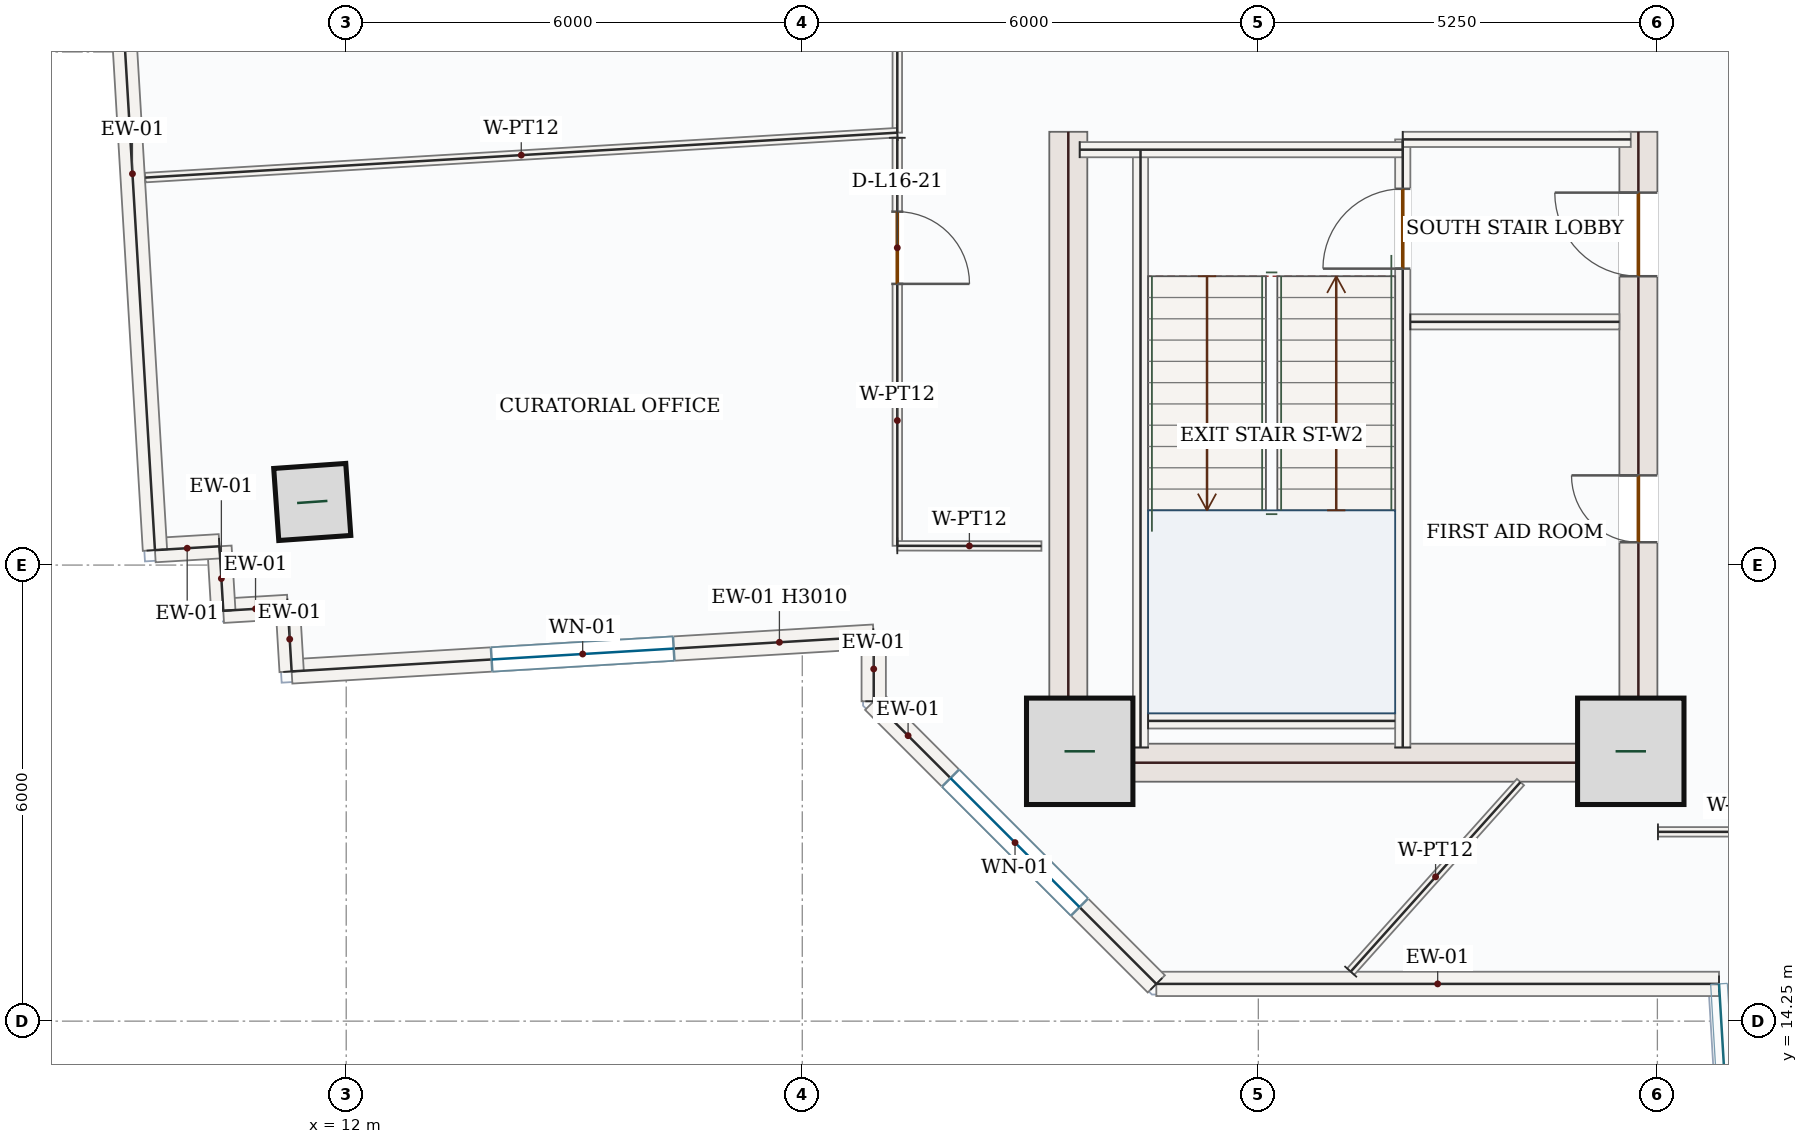
"""IFC4 building model, lengths in metres.
Left out: names, types, materials, properties, quantities, classifications, styles, units other than length and angle.
Written with IfcOpenShell. Run it as: python <this file> out.ifc"""

import sys

from ifc_helpers import new_model, si_unit, direction, frame, frame_2d, origin, origin_2d, place, context, subcontext, project, spatial, rectangle, hollow_rectangle, extrude, source, transform, mapped, element, fill, save


model = new_model("IFC4")
c1 = context("Model", 3, precision=1e-05, world=origin(), true_north=direction((0.0, 1.0)))
c2 = subcontext(c1, "Body", "Model", "MODEL_VIEW")
j1 = project(units=[si_unit("LENGTHUNIT", "METRE"), si_unit("PLANEANGLEUNIT", "RADIAN")], contexts=[c1])
p1 = place(None, origin())
s1 = spatial("IfcSite", under=j1, at=p1, CompositionType="ELEMENT")
p2 = place(p1, origin())
s2 = spatial("IfcBuilding", under=s1, at=p2, CompositionType="ELEMENT")
p3 = place(p2, frame((0.0, 0.0, 75.3)))
s3 = spatial("IfcBuildingStorey", under=s2, at=p3, CompositionType="ELEMENT", Elevation=75.3)
m1 = source(origin(), c2, "Body", "SweptSolid", [
    extrude(rectangle(XDim=8.55, YDim=0.5, at=frame_2d((4.275, 0.0))), origin(), (0.0, 0.0, 1.0), 3.95),
])
p4 = place(p3, frame((21.5, 17.4, 0.0), z_axis=(0.0, 0.0, 1.0), x_axis=(0.0, 1.0, 0.0)))
e1 = element("IfcWall", 1, at=p4, inside=s3, PredefinedType="SHEAR", context=c2, shape_type="MappedRepresentation", body=[
    mapped(m1, transform((0.0, 0.0, 0.0), x_axis=(1.0, 0.0, 0.0), y_axis=(0.0, 1.0, 0.0), z_axis=(0.0, 0.0, 1.0), scale=1.0)),
])
p5 = place(p3, frame((29.0, 17.4, 0.0), z_axis=(0.0, 0.0, 1.0), x_axis=(0.0, 1.0, 0.0)))
e2 = element("IfcWall", 2, at=p5, inside=s3, PredefinedType="SHEAR", context=c2, shape_type="SweptSolid", body=[
    extrude(rectangle(XDim=8.55, YDim=0.5, at=frame_2d((4.275, 0.0))), origin(), (0.0, 0.0, 1.0), 3.95),
])
p6 = place(p5, frame((6.65, 0.0, 0.0)))
e3 = element("IfcOpeningElement", 3, at=p6, cuts=e2, PredefinedType="OPENING", context=c2, shape_type="SweptSolid", body=[
    extrude(rectangle(XDim=1.1, YDim=2.2, at=frame_2d((0.55, 1.1))), frame((0.0, 0.26, 0.0), z_axis=(0.0, -1.0, 0.0), x_axis=(1.0, 0.0, 0.0)), (0.0, 0.0, 1.0), 0.52),
])
p7 = place(p5, frame((3.15, 0.0, 0.0)))
e4 = element("IfcOpeningElement", 4, at=p7, cuts=e2, PredefinedType="OPENING", context=c2, shape_type="SweptSolid", body=[
    extrude(rectangle(XDim=0.88, YDim=2.1, at=frame_2d((0.44, 1.05))), frame((0.0, 0.26, 0.0), z_axis=(0.0, -1.0, 0.0), x_axis=(1.0, 0.0, 0.0)), (0.0, 0.0, 1.0), 0.52),
])
m2 = source(origin(), c2, "Body", "SweptSolid", [
    extrude(rectangle(XDim=7.0, YDim=0.5, at=frame_2d((3.5, 0.0))), origin(), (0.0, 0.0, 1.0), 3.95),
])
p8 = place(p3, frame((21.75, 17.65, 0.0), z_axis=(0.0, 0.0, 1.0), x_axis=(1.0, 0.0, 0.0)))
e5 = element("IfcWall", 5, at=p8, inside=s3, PredefinedType="SHEAR", context=c2, shape_type="MappedRepresentation", body=[
    mapped(m2, transform((0.0, 0.0, 0.0), x_axis=(1.0, 0.0, 0.0), y_axis=(0.0, 1.0, 0.0), z_axis=(0.0, 0.0, 1.0), scale=1.0)),
])
m3 = source(origin(), c2, "Body", "SweptSolid", [
    extrude(rectangle(XDim=1.4, YDim=1.4, at=origin_2d()), origin(), (0.0, 0.0, 1.0), 4.2),
])
for number, where, z_axis, x_axis in (
    (6, (21.65, 17.8, 0.0), (0.0, 0.0, 1.0), (1.0, 0.0, 0.0)),
    (7, (28.9, 17.8, 0.0), (0.0, 0.0, 1.0), (1.0, 0.0, 0.0)),
):
    element("IfcColumn", number, at=place(p3, frame(where, z_axis=z_axis, x_axis=x_axis)), inside=s3, PredefinedType="COLUMN", context=c2, shape_type="MappedRepresentation", body=[
        mapped(m3, transform((0.0, 0.0, 0.0), x_axis=(1.0, 0.0, 0.0), y_axis=(0.0, 1.0, 0.0), z_axis=(0.0, 0.0, 1.0), scale=1.0)),
    ])
m4 = source(origin(), c2, "Body", "SweptSolid", [
    extrude(hollow_rectangle(XDim=0.95, YDim=0.95, WallThickness=0.05, at=origin_2d()), origin(), (0.0, 0.0, 1.0), 4.2),
])
p9 = place(p3, frame((11.553, 21.08, 0.0), z_axis=(0.0, 0.0, 1.0), x_axis=(0.99756405026, 0.069756473744, 0.0)))
e8 = element("IfcColumn", 8, at=p9, inside=s3, PredefinedType="COLUMN", context=c2, shape_type="MappedRepresentation", body=[
    mapped(m4, transform((0.0, 0.0, 0.0), x_axis=(1.0, 0.0, 0.0), y_axis=(0.0, 1.0, 0.0), z_axis=(0.0, 0.0, 1.0), scale=1.0)),
])
m5 = source(origin(), c2, "Body", "SweptSolid", [
    extrude(rectangle(XDim=7.403, YDim=0.32, at=frame_2d((3.701, 0.0))), origin(), (0.0, 0.0, 1.0), 3.95),
])
p10 = place(p3, frame((30.061, 14.74, 0.0), z_axis=(0.0, 0.0, 1.0), x_axis=(-1.0, 0.0, 0.0)))
e9 = element("IfcWall", 9, at=p10, inside=s3, PredefinedType="SOLIDWALL", context=c2, shape_type="MappedRepresentation", body=[
    mapped(m5, transform((0.0, 0.0, 0.0), x_axis=(1.0, 0.0, 0.0), y_axis=(0.0, 1.0, 0.0), z_axis=(0.0, 0.0, 1.0), scale=1.0)),
])
p11 = place(p3, frame((22.658, 14.74, 0.0), z_axis=(0.0, 0.0, 1.0), x_axis=(-0.707106781187, 0.707106781187, 0.0)))
e10 = element("IfcWall", 10, at=p11, inside=s3, PredefinedType="SOLIDWALL", context=c2, shape_type="SweptSolid", body=[
    extrude(rectangle(XDim=5.258, YDim=0.32, at=frame_2d((2.629, 0.0))), origin(), (0.0, 0.0, 1.0), 3.95),
])
p12 = place(p11, frame((1.429, 0.0, 0.85)))
e11 = element("IfcOpeningElement", 11, at=p12, cuts=e10, PredefinedType="OPENING", context=c2, shape_type="SweptSolid", body=[
    extrude(rectangle(XDim=2.4, YDim=1.8, at=frame_2d((1.2, 0.9))), frame((0.0, 0.17, 0.0), z_axis=(0.0, -1.0, 0.0), x_axis=(1.0, 0.0, 0.0)), (0.0, 0.0, 1.0), 0.34),
])
m6 = source(origin(), c2, "Body", "SweptSolid", [
    extrude(rectangle(XDim=0.851, YDim=0.32, at=frame_2d((0.425, 0.0))), origin(), (0.0, 0.0, 1.0), 3.95),
])
p13 = place(p3, frame((18.94, 18.458, 0.0), z_axis=(0.0, 0.0, 1.0), x_axis=(0.0, 1.0, 0.0)))
e12 = element("IfcWall", 12, at=p13, inside=s3, PredefinedType="SOLIDWALL", context=c2, shape_type="MappedRepresentation", body=[
    mapped(m6, transform((0.0, 0.0, 0.0), x_axis=(1.0, 0.0, 0.0), y_axis=(0.0, 1.0, 0.0), z_axis=(0.0, 0.0, 1.0), scale=1.0)),
])
p14 = place(p3, frame((18.94, 19.309, 0.0), z_axis=(0.0, 0.0, 1.0), x_axis=(-0.998218176762, -0.059669687296, 0.0)))
e13 = element("IfcWall", 13, at=p14, inside=s3, PredefinedType="SOLIDWALL", context=c2, shape_type="SweptSolid", body=[
    extrude(rectangle(XDim=7.672, YDim=0.32, at=frame_2d((3.836, 0.0))), origin(), (0.0, 0.0, 1.0), 3.01),
])
p15 = place(p14, frame((2.636, 0.0, 0.85)))
e14 = element("IfcOpeningElement", 14, at=p15, cuts=e13, PredefinedType="OPENING", context=c2, shape_type="SweptSolid", body=[
    extrude(rectangle(XDim=2.4, YDim=1.8, at=frame_2d((1.2, 0.9))), frame((0.0, 0.17, 0.0), z_axis=(0.0, -1.0, 0.0), x_axis=(1.0, 0.0, 0.0)), (0.0, 0.0, 1.0), 0.34),
])
m7 = source(origin(), c2, "Body", "SweptSolid", [
    extrude(rectangle(XDim=0.85, YDim=0.32, at=frame_2d((0.425, 0.0))), origin(), (0.0, 0.0, 1.0), 3.95),
])
for number, where, z_axis, x_axis in (
    (15, (11.282, 18.851, 0.0), (0.0, 0.0, 1.0), (-0.059, 0.998, 0.0)),
    (16, (11.231, 19.699, 0.0), (0.0, 0.0, 1.0), (-0.998, -0.06, 0.0)),
    (17, (10.383, 19.649, 0.0), (0.0, 0.0, 1.0), (-0.059, 0.998, 0.0)),
    (18, (10.332, 20.497, 0.0), (0.0, 0.0, 1.0), (-0.998, -0.06, 0.0)),
):
    element("IfcWall", number, at=place(p3, frame(where, z_axis=z_axis, x_axis=x_axis)), inside=s3, PredefinedType="SOLIDWALL", context=c2, shape_type="MappedRepresentation", body=[
        mapped(m7, transform((0.0, 0.0, 0.0), x_axis=(1.0, 0.0, 0.0), y_axis=(0.0, 1.0, 0.0), z_axis=(0.0, 0.0, 1.0), scale=1.0)),
    ])
m8 = source(origin(), c2, "Body", "SweptSolid", [
    extrude(rectangle(XDim=9.92, YDim=0.32, at=frame_2d((4.96, 0.0))), origin(), (0.0, 0.0, 1.0), 3.95),
])
p16 = place(p3, frame((9.484, 20.447, 0.0), z_axis=(0.0, 0.0, 1.0), x_axis=(-0.059656871726, 0.998218942745, 0.0)))
e19 = element("IfcWall", 19, at=p16, inside=s3, PredefinedType="SOLIDWALL", context=c2, shape_type="MappedRepresentation", body=[
    mapped(m8, transform((0.0, 0.0, 0.0), x_axis=(1.0, 0.0, 0.0), y_axis=(0.0, 1.0, 0.0), z_axis=(0.0, 0.0, 1.0), scale=1.0)),
])
m9 = source(origin(), c2, "Body", "SweptSolid", [
    extrude(rectangle(XDim=7.87, YDim=0.2, at=frame_2d((3.935, 0.0))), origin(), (0.0, 0.0, 1.0), 3.95),
])
p17 = place(p3, frame((22.45, 17.85, 0.0), z_axis=(0.0, 0.0, 1.0), x_axis=(0.0, 1.0, 0.0)))
e20 = element("IfcWall", 20, at=p17, inside=s3, PredefinedType="SOLIDWALL", context=c2, shape_type="MappedRepresentation", body=[
    mapped(m9, transform((0.0, 0.0, 0.0), x_axis=(1.0, 0.0, 0.0), y_axis=(0.0, 1.0, 0.0), z_axis=(0.0, 0.0, 1.0), scale=1.0)),
])
p18 = place(p3, frame((25.9, 17.85, 0.0), z_axis=(0.0, 0.0, 1.0), x_axis=(0.0, 1.0, 0.0)))
e21 = element("IfcWall", 21, at=p18, inside=s3, PredefinedType="SOLIDWALL", context=c2, shape_type="SweptSolid", body=[
    extrude(rectangle(XDim=8.0, YDim=0.2, at=frame_2d((4.0, 0.0))), origin(), (0.0, 0.0, 1.0), 3.95),
])
p19 = place(p18, frame((6.3, 0.0, 0.0)))
e22 = element("IfcOpeningElement", 22, at=p19, cuts=e21, PredefinedType="OPENING", context=c2, shape_type="SweptSolid", body=[
    extrude(rectangle(XDim=1.05, YDim=2.15, at=frame_2d((0.525, 1.075))), frame((0.0, 0.11, 0.0), z_axis=(0.0, -1.0, 0.0), x_axis=(1.0, 0.0, 0.0)), (0.0, 0.0, 1.0), 0.22),
])
m10 = source(origin(), c2, "Body", "SweptSolid", [
    extrude(rectangle(XDim=4.25, YDim=0.2, at=frame_2d((2.125, 0.0))), origin(), (0.0, 0.0, 1.0), 3.95),
])
p20 = place(p3, frame((21.65, 25.715, 0.0), z_axis=(0.0, 0.0, 1.0), x_axis=(1.0, 0.0, 0.0)))
e23 = element("IfcWall", 23, at=p20, inside=s3, PredefinedType="SOLIDWALL", context=c2, shape_type="MappedRepresentation", body=[
    mapped(m10, transform((0.0, 0.0, 0.0), x_axis=(1.0, 0.0, 0.0), y_axis=(0.0, 1.0, 0.0), z_axis=(0.0, 0.0, 1.0), scale=1.0)),
])
m11 = source(origin(), c2, "Body", "SweptSolid", [
    extrude(rectangle(XDim=3.0, YDim=0.2, at=frame_2d((1.5, 0.0))), origin(), (0.0, 0.0, 1.0), 3.95),
])
p21 = place(p3, frame((25.9, 25.85, 0.0), z_axis=(0.0, 0.0, 1.0), x_axis=(1.0, 0.0, 0.0)))
e24 = element("IfcWall", 24, at=p21, inside=s3, PredefinedType="SOLIDWALL", context=c2, shape_type="MappedRepresentation", body=[
    mapped(m11, transform((0.0, 0.0, 0.0), x_axis=(1.0, 0.0, 0.0), y_axis=(0.0, 1.0, 0.0), z_axis=(0.0, 0.0, 1.0), scale=1.0)),
])
m12 = source(origin(), c2, "Body", "SweptSolid", [
    extrude(rectangle(XDim=3.25, YDim=0.2, at=frame_2d((1.625, 0.0))), origin(), (0.0, 0.0, 1.0), 3.95),
])
p22 = place(p3, frame((22.55, 18.2, 0.0), z_axis=(0.0, 0.0, 1.0), x_axis=(1.0, 0.0, 0.0)))
e25 = element("IfcWall", 25, at=p22, inside=s3, PredefinedType="SOLIDWALL", context=c2, shape_type="MappedRepresentation", body=[
    mapped(m12, transform((0.0, 0.0, 0.0), x_axis=(1.0, 0.0, 0.0), y_axis=(0.0, 1.0, 0.0), z_axis=(0.0, 0.0, 1.0), scale=1.0)),
])
m13 = source(origin(), c2, "Body", "SweptSolid", [
    extrude(rectangle(XDim=2.75, YDim=0.2, at=frame_2d((1.375, 0.0))), origin(), (0.0, 0.0, 1.0), 3.95),
])
p23 = place(p3, frame((26.0, 23.45, 0.0), z_axis=(0.0, 0.0, 1.0), x_axis=(1.0, 0.0, 0.0)))
e26 = element("IfcWall", 26, at=p23, inside=s3, PredefinedType="SOLIDWALL", context=c2, shape_type="MappedRepresentation", body=[
    mapped(m13, transform((0.0, 0.0, 0.0), x_axis=(1.0, 0.0, 0.0), y_axis=(0.0, 1.0, 0.0), z_axis=(0.0, 0.0, 1.0), scale=1.0)),
])
p24 = place(p3, frame((29.258, 16.74, 0.0), z_axis=(0.0, 0.0, 1.0), x_axis=(0.999999998192, -6.0135907e-05, 0.0)))
e27 = element("IfcWall", 27, at=p24, inside=s3, PredefinedType="PARTITIONING", context=c2, shape_type="SweptSolid", body=[
    extrude(rectangle(XDim=4.06, YDim=0.125, at=frame_2d((2.03, 0.0))), origin(), (0.0, 0.0, 1.0), 3.95),
])
p25 = place(p24, frame((2.426, 0.0, 0.0)))
e28 = element("IfcOpeningElement", 28, at=p25, cuts=e27, PredefinedType="OPENING", context=c2, shape_type="SweptSolid", body=[
    extrude(rectangle(XDim=0.95, YDim=2.15, at=frame_2d((0.475, 1.075))), frame((0.0, 0.073, 0.0), z_axis=(0.0, -1.0, 0.0), x_axis=(1.0, 0.0, 0.0)), (0.0, 0.0, 1.0), 0.145),
])
m14 = source(origin(), c2, "Body", "SweptSolid", [
    extrude(rectangle(XDim=3.348, YDim=0.125, at=frame_2d((1.674, 0.0))), origin(), (0.0, 0.0, 1.0), 3.95),
])
p26 = place(p3, frame((25.215, 14.901, 0.0), z_axis=(0.0, 0.0, 1.0), x_axis=(0.667206176518, 0.74487308853, 0.0)))
e29 = element("IfcWall", 29, at=p26, inside=s3, PredefinedType="PARTITIONING", context=c2, shape_type="MappedRepresentation", body=[
    mapped(m14, transform((0.0, 0.0, 0.0), x_axis=(1.0, 0.0, 0.0), y_axis=(0.0, 1.0, 0.0), z_axis=(0.0, 0.0, 1.0), scale=1.0)),
])
p27 = place(p3, frame((19.253, 33.497, 0.0), z_axis=(0.0, 0.0, 1.0), x_axis=(-0.000355308612, -0.999999936878, 0.0)))
e30 = element("IfcWall", 30, at=p27, inside=s3, PredefinedType="PARTITIONING", context=c2, shape_type="SweptSolid", body=[
    extrude(rectangle(XDim=7.558, YDim=0.125, at=frame_2d((3.779, 0.0))), origin(), (0.0, 0.0, 1.0), 3.95),
])
p28 = place(p27, frame((5.155, 0.0, 0.0)))
e31 = element("IfcOpeningElement", 31, at=p28, cuts=e30, PredefinedType="OPENING", context=c2, shape_type="SweptSolid", body=[
    extrude(rectangle(XDim=0.95, YDim=2.15, at=frame_2d((0.475, 1.075))), frame((0.0, 0.073, 0.0), z_axis=(0.0, -1.0, 0.0), x_axis=(1.0, 0.0, 0.0)), (0.0, 0.0, 1.0), 0.145),
])
m15 = source(origin(), c2, "Body", "SweptSolid", [
    extrude(rectangle(XDim=9.911, YDim=0.125, at=frame_2d((4.956, 0.0))), origin(), (0.0, 0.0, 1.0), 3.95),
])
p29 = place(p3, frame((19.25, 25.939, 0.0), z_axis=(0.0, 0.0, 1.0), x_axis=(-0.998218808208, -0.05965912285, 0.0)))
e32 = element("IfcWall", 32, at=p29, inside=s3, PredefinedType="PARTITIONING", context=c2, shape_type="MappedRepresentation", body=[
    mapped(m15, transform((0.0, 0.0, 0.0), x_axis=(1.0, 0.0, 0.0), y_axis=(0.0, 1.0, 0.0), z_axis=(0.0, 0.0, 1.0), scale=1.0)),
])
p30 = place(p3, frame((19.25, 25.871, 0.0), z_axis=(0.0, 0.0, 1.0), x_axis=(9.0962841e-05, -0.999999995863, 0.0)))
e33 = element("IfcWall", 33, at=p30, inside=s3, PredefinedType="PARTITIONING", context=c2, shape_type="SweptSolid", body=[
    extrude(rectangle(XDim=5.368, YDim=0.125, at=frame_2d((2.684, 0.0))), origin(), (0.0, 0.0, 1.0), 3.95),
])
p31 = place(p30, frame((0.972, 0.0, 0.0)))
e34 = element("IfcOpeningElement", 34, at=p31, cuts=e33, PredefinedType="OPENING", context=c2, shape_type="SweptSolid", body=[
    extrude(rectangle(XDim=0.95, YDim=2.15, at=frame_2d((0.475, 1.075))), frame((0.0, 0.073, 0.0), z_axis=(0.0, -1.0, 0.0), x_axis=(1.0, 0.0, 0.0)), (0.0, 0.0, 1.0), 0.145),
])
m16 = source(origin(), c2, "Body", "SweptSolid", [
    extrude(rectangle(XDim=1.896, YDim=0.125, at=frame_2d((0.948, 0.0))), origin(), (0.0, 0.0, 1.0), 3.95),
])
p32 = place(p3, frame((19.25, 20.503, 0.0), z_axis=(0.0, 0.0, 1.0), x_axis=(0.999998806185, -0.001545195168, 0.0)))
e35 = element("IfcWall", 35, at=p32, inside=s3, PredefinedType="PARTITIONING", context=c2, shape_type="MappedRepresentation", body=[
    mapped(m16, transform((0.0, 0.0, 0.0), x_axis=(1.0, 0.0, 0.0), y_axis=(0.0, 1.0, 0.0), z_axis=(0.0, 0.0, 1.0), scale=1.0)),
])
m17 = source(origin(), c2, "Body", "SweptSolid", [
    extrude(rectangle(XDim=2.4, YDim=1.8, at=frame_2d((1.2, 0.9))), frame((0.0, 0.03, 0.0), z_axis=(0.0, -1.0, 0.0), x_axis=(1.0, 0.0, 0.0)), (0.0, 0.0, 1.0), 0.06),
])
p33 = place(p12, origin())
e36 = element("IfcWindow", 36, at=p33, inside=s3, PartitioningType="DOUBLE_PANEL_VERTICAL", PredefinedType="WINDOW", context=c2, shape_type="MappedRepresentation", body=[
    mapped(m17, transform((0.0, 0.0, 0.0), x_axis=(1.0, 0.0, 0.0), y_axis=(0.0, 1.0, 0.0), z_axis=(0.0, 0.0, 1.0), scale=1.0)),
])
fill(e11, e36)
p34 = place(p15, origin())
e37 = element("IfcWindow", 37, at=p34, inside=s3, PartitioningType="DOUBLE_PANEL_VERTICAL", PredefinedType="WINDOW", context=c2, shape_type="MappedRepresentation", body=[
    mapped(m17, transform((0.0, 0.0, 0.0), x_axis=(1.0, 0.0, 0.0), y_axis=(0.0, 1.0, 0.0), z_axis=(0.0, 0.0, 1.0), scale=1.0)),
])
fill(e14, e37)
m18 = source(origin(), c2, "Body", "SweptSolid", [
    extrude(rectangle(XDim=1.05, YDim=2.15, at=frame_2d((0.525, 1.075))), frame((0.0, 0.025, 0.0), z_axis=(0.0, -1.0, 0.0), x_axis=(1.0, 0.0, 0.0)), (0.0, 0.0, 1.0), 0.05),
])
p35 = place(p19, origin())
e38 = element("IfcDoor", 38, at=p35, inside=s3, OperationType="SINGLE_SWING_LEFT", PredefinedType="DOOR", context=c2, shape_type="MappedRepresentation", body=[
    mapped(m18, transform((0.0, 0.0, 0.0), x_axis=(1.0, 0.0, 0.0), y_axis=(0.0, 1.0, 0.0), z_axis=(0.0, 0.0, 1.0), scale=1.0)),
])
fill(e22, e38)
m19 = source(origin(), c2, "Body", "SweptSolid", [
    extrude(rectangle(XDim=1.1, YDim=2.2, at=frame_2d((0.55, 1.1))), frame((0.0, 0.025, 0.0), z_axis=(0.0, -1.0, 0.0), x_axis=(1.0, 0.0, 0.0)), (0.0, 0.0, 1.0), 0.05),
])
p36 = place(p6, origin())
e39 = element("IfcDoor", 39, at=p36, inside=s3, OperationType="SINGLE_SWING_RIGHT", PredefinedType="DOOR", context=c2, shape_type="MappedRepresentation", body=[
    mapped(m19, transform((0.0, 0.0, 0.0), x_axis=(1.0, 0.0, 0.0), y_axis=(0.0, 1.0, 0.0), z_axis=(0.0, 0.0, 1.0), scale=1.0)),
])
fill(e3, e39)
m20 = source(origin(), c2, "Body", "SweptSolid", [
    extrude(rectangle(XDim=0.88, YDim=2.1, at=frame_2d((0.44, 1.05))), frame((0.0, 0.025, 0.0), z_axis=(0.0, -1.0, 0.0), x_axis=(1.0, 0.0, 0.0)), (0.0, 0.0, 1.0), 0.05),
])
p37 = place(p7, origin())
e40 = element("IfcDoor", 40, at=p37, inside=s3, OperationType="SINGLE_SWING_RIGHT", PredefinedType="DOOR", context=c2, shape_type="MappedRepresentation", body=[
    mapped(m20, transform((0.0, 0.0, 0.0), x_axis=(1.0, 0.0, 0.0), y_axis=(0.0, 1.0, 0.0), z_axis=(0.0, 0.0, 1.0), scale=1.0)),
])
fill(e4, e40)
m21 = source(origin(), c2, "Body", "SweptSolid", [
    extrude(rectangle(XDim=0.95, YDim=2.15, at=frame_2d((0.475, 1.075))), frame((0.0, 0.025, 0.0), z_axis=(0.0, -1.0, 0.0), x_axis=(1.0, 0.0, 0.0)), (0.0, 0.0, 1.0), 0.05),
])
p38 = place(p31, origin())
e41 = element("IfcDoor", 41, at=p38, inside=s3, OperationType="SINGLE_SWING_RIGHT", PredefinedType="DOOR", context=c2, shape_type="MappedRepresentation", body=[
    mapped(m21, transform((0.0, 0.0, 0.0), x_axis=(1.0, 0.0, 0.0), y_axis=(0.0, 1.0, 0.0), z_axis=(0.0, 0.0, 1.0), scale=1.0)),
])
fill(e34, e41)
save(model, sys.argv[1])
